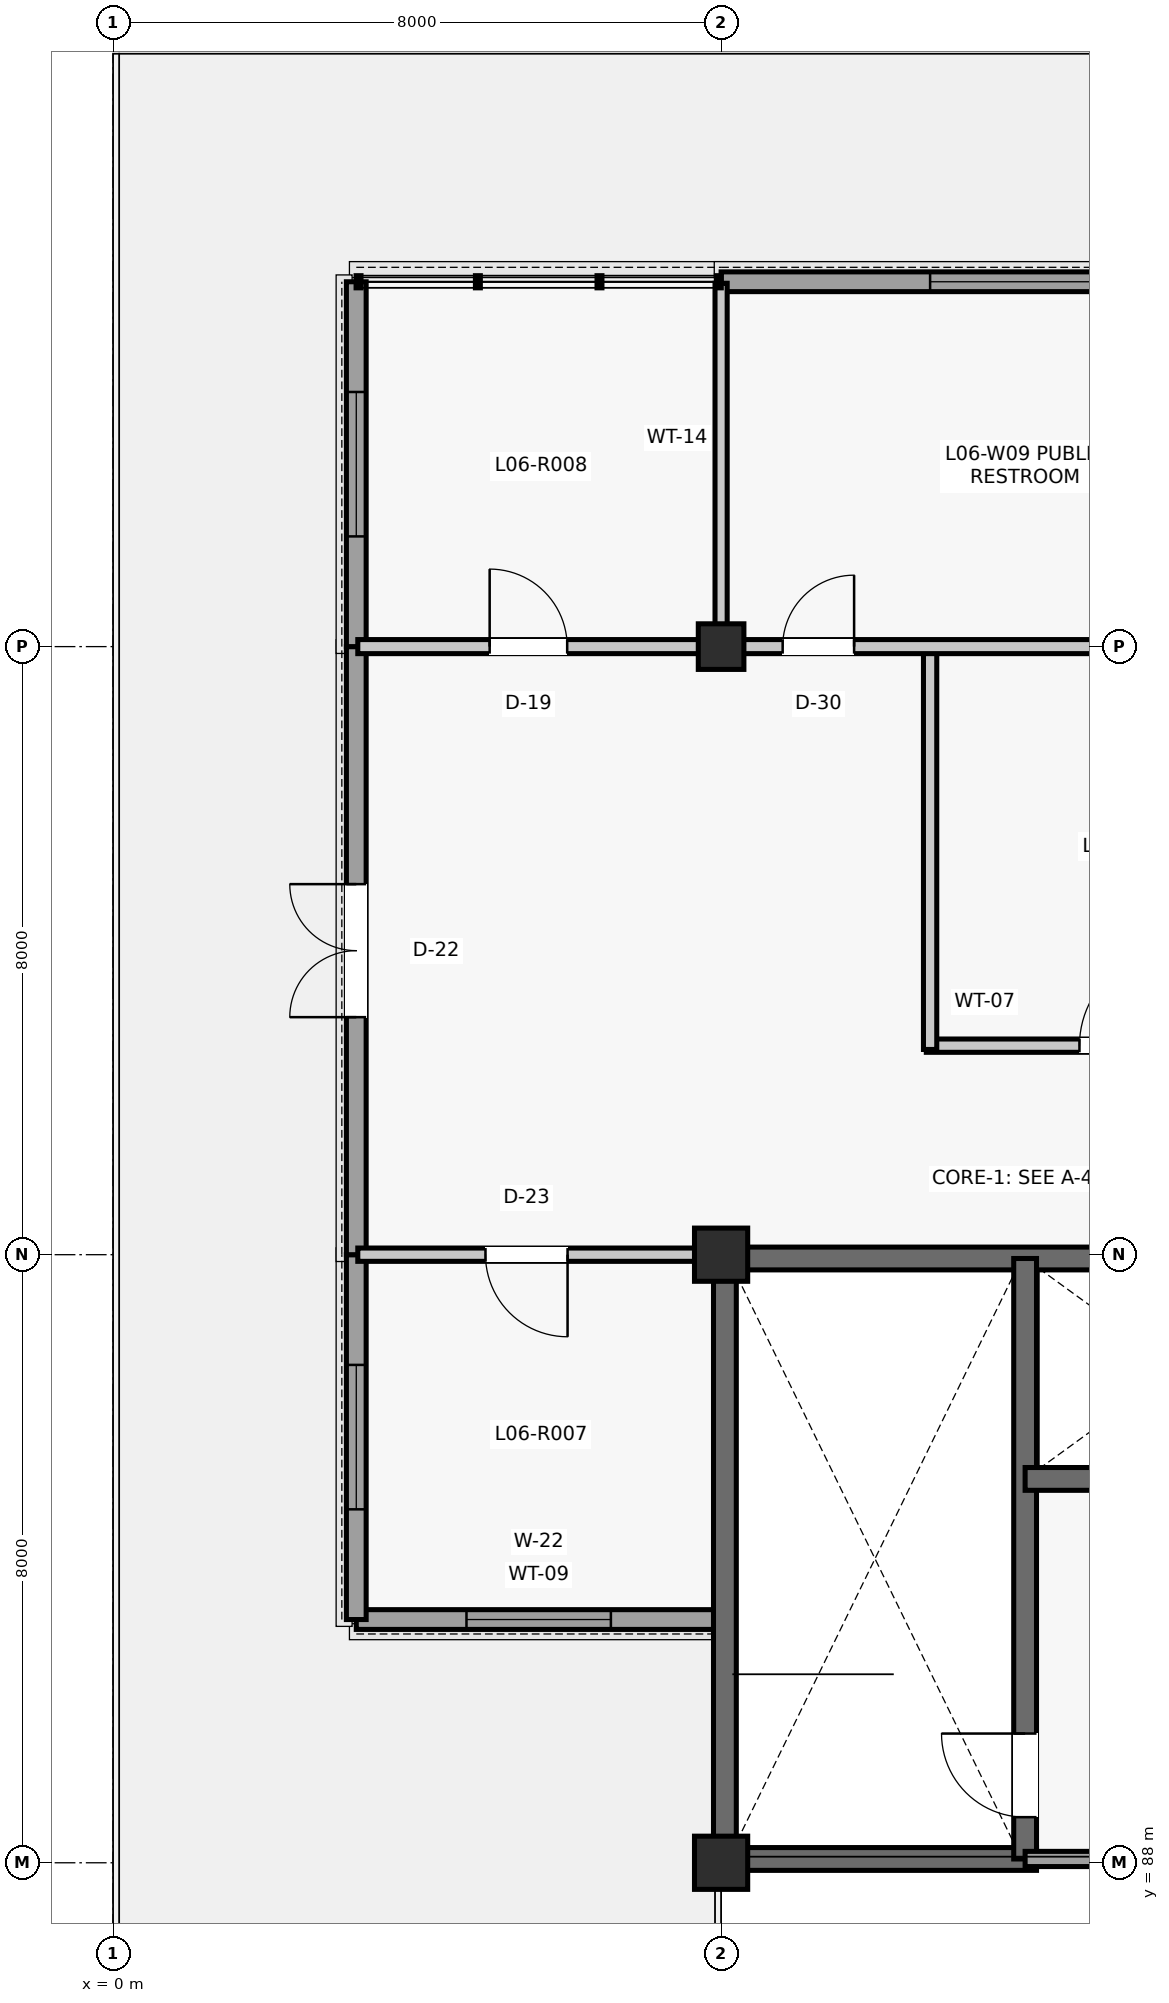
"""IFC4 building model, lengths in metres.
Left out: names, types, materials, properties, quantities, classifications, styles, units other than length and angle.
Written with IfcOpenShell. Run it as: python <this file> out.ifc"""

import sys

from ifc_helpers import new_model, si_unit, direction, frame, frame_2d, origin, origin_2d, place, context, subcontext, project, spatial, rectangle, extrude, element, fill, save


model = new_model("IFC4")
c1 = context("Model", 3, precision=1e-05, world=origin(), true_north=direction((0.0, 1.0)))
c2 = subcontext(c1, "Body", "Model", "MODEL_VIEW")
j1 = project(units=[si_unit("LENGTHUNIT", "METRE"), si_unit("PLANEANGLEUNIT", "RADIAN")], contexts=[c1])
p1 = place(None, origin())
s1 = spatial("IfcSite", under=j1, at=p1, CompositionType="ELEMENT")
p2 = place(p1, origin())
s2 = spatial("IfcBuilding", under=s1, at=p2, CompositionType="ELEMENT")
p3 = place(p2, frame((0.0, 0.0, 25.74)))
s3 = spatial("IfcBuildingStorey", under=s2, at=p3, CompositionType="ELEMENT", Elevation=25.74)
for number, where, z_axis, x_axis in (
    (1, (8.0, 88.0, 0.0), (0.0, 0.0, 1.0), (1.0, 0.0, 0.0)),
    (2, (8.0, 96.0, 0.0), (0.0, 0.0, 1.0), (1.0, 0.0, 0.0)),
):
    element("IfcColumn", number, at=place(p3, frame(where, z_axis=z_axis, x_axis=x_axis)), inside=s3, PredefinedType="COLUMN", context=c2, shape_type="SweptSolid", body=[
        extrude(rectangle(XDim=0.7, YDim=0.7, at=origin_2d()), origin(), (0.0, 0.0, 1.0), 4.29),
    ])
p4 = place(p3, frame((8.0, 104.0, 0.0), z_axis=(0.0, 0.0, 1.0), x_axis=(1.0, 0.0, 0.0)))
e3 = element("IfcColumn", 3, at=p4, inside=s3, PredefinedType="COLUMN", context=c2, shape_type="SweptSolid", body=[
    extrude(rectangle(XDim=0.6, YDim=0.6, at=origin_2d()), origin(), (0.0, 0.0, 1.0), 4.29),
])
p5 = place(p3, frame((3.2, 91.2, 0.0), z_axis=(0.0, 0.0, 1.0), x_axis=(1.0, 0.0, 0.0)))
e4 = element("IfcWall", 4, at=p5, inside=s3, PredefinedType="SOLIDWALL", context=c2, shape_type="SweptSolid", body=[
    extrude(rectangle(XDim=4.8, YDim=0.26, at=frame_2d((2.4, 0.0))), origin(), (0.0, 0.0, 1.0), 4.09),
])
p6 = place(p5, frame((1.45, 0.0, 0.85)))
e5 = element("IfcOpeningElement", 5, at=p6, cuts=e4, PredefinedType="OPENING", context=c2, shape_type="SweptSolid", body=[
    extrude(rectangle(XDim=1.9, YDim=2.2, at=frame_2d((0.95, 1.1))), frame((0.0, 0.14, 0.0), z_axis=(0.0, -1.0, 0.0), x_axis=(1.0, 0.0, 0.0)), (0.0, 0.0, 1.0), 0.28),
])
p7 = place(p3, frame((8.0, 108.8, 0.0), z_axis=(0.0, 0.0, 1.0), x_axis=(1.0, 0.0, 0.0)))
e6 = element("IfcWall", 6, at=p7, inside=s3, PredefinedType="SOLIDWALL", context=c2, shape_type="SweptSolid", body=[
    extrude(rectangle(XDim=8.0, YDim=0.26, at=frame_2d((4.0, 0.0))), origin(), (0.0, 0.0, 1.0), 4.09),
])
p8 = place(p7, frame((2.75, 0.0, 0.85)))
e7 = element("IfcOpeningElement", 7, at=p8, cuts=e6, PredefinedType="OPENING", context=c2, shape_type="SweptSolid", body=[
    extrude(rectangle(XDim=2.5, YDim=2.2, at=frame_2d((1.25, 1.1))), frame((0.0, 0.14, 0.0), z_axis=(0.0, -1.0, 0.0), x_axis=(1.0, 0.0, 0.0)), (0.0, 0.0, 1.0), 0.28),
])
p9 = place(p3, frame((3.2, 91.2, 0.0), z_axis=(0.0, 0.0, 1.0), x_axis=(0.0, 1.0, 0.0)))
e8 = element("IfcWall", 8, at=p9, inside=s3, PredefinedType="SOLIDWALL", context=c2, shape_type="SweptSolid", body=[
    extrude(rectangle(XDim=4.8, YDim=0.26, at=frame_2d((2.4, 0.0))), origin(), (0.0, 0.0, 1.0), 4.09),
])
p10 = place(p9, frame((1.45, 0.0, 0.85)))
e9 = element("IfcOpeningElement", 9, at=p10, cuts=e8, PredefinedType="OPENING", context=c2, shape_type="SweptSolid", body=[
    extrude(rectangle(XDim=1.9, YDim=2.2, at=frame_2d((0.95, 1.1))), frame((0.0, 0.14, 0.0), z_axis=(0.0, -1.0, 0.0), x_axis=(1.0, 0.0, 0.0)), (0.0, 0.0, 1.0), 0.28),
])
p11 = place(p3, frame((3.2, 96.0, 0.0), z_axis=(0.0, 0.0, 1.0), x_axis=(0.0, 1.0, 0.0)))
e10 = element("IfcWall", 10, at=p11, inside=s3, PredefinedType="SOLIDWALL", context=c2, shape_type="SweptSolid", body=[
    extrude(rectangle(XDim=8.0, YDim=0.26, at=frame_2d((4.0, 0.0))), origin(), (0.0, 0.0, 1.0), 4.09),
])
p12 = place(p11, frame((3.125, 0.0, 0.0)))
e11 = element("IfcOpeningElement", 11, at=p12, cuts=e10, PredefinedType="OPENING", context=c2, shape_type="SweptSolid", body=[
    extrude(rectangle(XDim=1.75, YDim=2.2, at=frame_2d((0.875, 1.1))), frame((0.0, 0.14, 0.0), z_axis=(0.0, -1.0, 0.0), x_axis=(1.0, 0.0, 0.0)), (0.0, 0.0, 1.0), 0.28),
])
p13 = place(p3, frame((3.2, 104.0, 0.0), z_axis=(0.0, 0.0, 1.0), x_axis=(0.0, 1.0, 0.0)))
e12 = element("IfcWall", 12, at=p13, inside=s3, PredefinedType="SOLIDWALL", context=c2, shape_type="SweptSolid", body=[
    extrude(rectangle(XDim=4.8, YDim=0.26, at=frame_2d((2.4, 0.0))), origin(), (0.0, 0.0, 1.0), 4.09),
])
p14 = place(p13, frame((1.45, 0.0, 0.85)))
e13 = element("IfcOpeningElement", 13, at=p14, cuts=e12, PredefinedType="OPENING", context=c2, shape_type="SweptSolid", body=[
    extrude(rectangle(XDim=1.9, YDim=2.2, at=frame_2d((0.95, 1.1))), frame((0.0, 0.14, 0.0), z_axis=(0.0, -1.0, 0.0), x_axis=(1.0, 0.0, 0.0)), (0.0, 0.0, 1.0), 0.28),
])
for number, where, z_axis, x_axis in (
    (14, (8.05, 88.24, 0.0), (0.0, 0.0, 1.0), (0.0, 1.0, 0.0)),
    (15, (8.24, 95.95, 0.0), (0.0, 0.0, 1.0), (1.0, 0.0, 0.0)),
):
    element("IfcWall", number, at=place(p3, frame(where, z_axis=z_axis, x_axis=x_axis)), inside=s3, PredefinedType="SHEAR", context=c2, shape_type="SweptSolid", body=[
        extrude(rectangle(XDim=7.52, YDim=0.3, at=frame_2d((3.76, 0.0))), origin(), (0.0, 0.0, 1.0), 4.09),
    ])
p15 = place(p3, frame((8.24, 88.05, 0.0), z_axis=(0.0, 0.0, 1.0), x_axis=(1.0, 0.0, 0.0)))
e16 = element("IfcWall", 16, at=p15, inside=s3, PredefinedType="SHEAR", context=c2, shape_type="SweptSolid", body=[
    extrude(rectangle(XDim=3.91, YDim=0.3, at=frame_2d((1.955, 0.0))), origin(), (0.0, 0.0, 1.0), 4.09),
])
p16 = place(p3, frame((12.0, 88.05, 0.0), z_axis=(0.0, 0.0, 1.0), x_axis=(0.0, 1.0, 0.0)))
e17 = element("IfcWall", 17, at=p16, inside=s3, PredefinedType="SHEAR", context=c2, shape_type="SweptSolid", body=[
    extrude(rectangle(XDim=7.9, YDim=0.3, at=frame_2d((3.95, 0.0))), origin(), (0.0, 0.0, 1.0), 4.09),
])
p17 = place(p16, frame((0.55, 0.0, 0.0)))
e18 = element("IfcOpeningElement", 18, at=p17, cuts=e17, PredefinedType="OPENING", context=c2, shape_type="SweptSolid", body=[
    extrude(rectangle(XDim=1.1, YDim=2.15, at=frame_2d((0.55, 1.075))), frame((0.0, 0.16, 0.0), z_axis=(0.0, -1.0, 0.0), x_axis=(1.0, 0.0, 0.0)), (0.0, 0.0, 1.0), 0.32),
])
p18 = place(p3, frame((12.0, 93.05, 0.0), z_axis=(0.0, 0.0, 1.0), x_axis=(1.0, 0.0, 0.0)))
e19 = element("IfcWall", 19, at=p18, inside=s3, PredefinedType="SHEAR", context=c2, shape_type="SweptSolid", body=[
    extrude(rectangle(XDim=3.95, YDim=0.3, at=frame_2d((1.975, 0.0))), origin(), (0.0, 0.0, 1.0), 4.09),
])
p19 = place(p18, frame((1.375, 0.0, 0.0)))
e20 = element("IfcOpeningElement", 20, at=p19, cuts=e19, PredefinedType="OPENING", context=c2, shape_type="SweptSolid", body=[
    extrude(rectangle(XDim=1.2, YDim=2.2, at=frame_2d((0.6, 1.1))), frame((0.0, 0.16, 0.0), z_axis=(0.0, -1.0, 0.0), x_axis=(1.0, 0.0, 0.0)), (0.0, 0.0, 1.0), 0.32),
])
p20 = place(p3, frame((12.0, 88.05, 0.0), z_axis=(0.0, 0.0, 1.0), x_axis=(1.0, 0.0, 0.0)))
e21 = element("IfcWall", 21, at=p20, inside=s3, PredefinedType="PARTITIONING", context=c2, shape_type="SweptSolid", body=[
    extrude(rectangle(XDim=3.66, YDim=0.2, at=frame_2d((1.83, 0.0))), origin(), (0.0, 0.0, 1.0), 3.408),
])
p21 = place(p3, frame((10.7, 98.75, 0.0), z_axis=(0.0, 0.0, 1.0), x_axis=(1.0, 0.0, 0.0)))
e22 = element("IfcWall", 22, at=p21, inside=s3, PredefinedType="PARTITIONING", context=c2, shape_type="SweptSolid", body=[
    extrude(rectangle(XDim=5.28, YDim=0.175, at=frame_2d((2.64, 0.0))), origin(), (0.0, 0.0, 1.0), 3.408),
])
p22 = place(p21, frame((2.015, 0.0, 0.0)))
e23 = element("IfcOpeningElement", 23, at=p22, cuts=e22, PredefinedType="OPENING", context=c2, shape_type="SweptSolid", body=[
    extrude(rectangle(XDim=1.25, YDim=2.18, at=frame_2d((0.625, 1.09))), frame((0.0, 0.097, 0.0), z_axis=(0.0, -1.0, 0.0), x_axis=(1.0, 0.0, 0.0)), (0.0, 0.0, 1.0), 0.195),
])
p23 = place(p3, frame((10.75, 98.7, 0.0), z_axis=(0.0, 0.0, 1.0), x_axis=(0.0, 1.0, 0.0)))
e24 = element("IfcWall", 24, at=p23, inside=s3, PredefinedType="PARTITIONING", context=c2, shape_type="SweptSolid", body=[
    extrude(rectangle(XDim=5.28, YDim=0.175, at=frame_2d((2.64, 0.0))), origin(), (0.0, 0.0, 1.0), 3.408),
])
p24 = place(p3, frame((3.22, 96.0, 0.0), z_axis=(0.0, 0.0, 1.0), x_axis=(1.0, 0.0, 0.0)))
e25 = element("IfcWall", 25, at=p24, inside=s3, PredefinedType="PARTITIONING", context=c2, shape_type="SweptSolid", body=[
    extrude(rectangle(XDim=4.44, YDim=0.175, at=frame_2d((2.22, 0.0))), origin(), (0.0, 0.0, 1.0), 3.408),
])
p25 = place(p24, frame((1.68, 0.0, 0.0)))
e26 = element("IfcOpeningElement", 26, at=p25, cuts=e25, PredefinedType="OPENING", context=c2, shape_type="SweptSolid", body=[
    extrude(rectangle(XDim=1.08, YDim=2.2, at=frame_2d((0.54, 1.1))), frame((0.0, 0.097, 0.0), z_axis=(0.0, -1.0, 0.0), x_axis=(1.0, 0.0, 0.0)), (0.0, 0.0, 1.0), 0.195),
])
p26 = place(p3, frame((3.22, 104.0, 0.0), z_axis=(0.0, 0.0, 1.0), x_axis=(1.0, 0.0, 0.0)))
e27 = element("IfcWall", 27, at=p26, inside=s3, PredefinedType="PARTITIONING", context=c2, shape_type="SweptSolid", body=[
    extrude(rectangle(XDim=4.49, YDim=0.185, at=frame_2d((2.245, 0.0))), origin(), (0.0, 0.0, 1.0), 3.408),
])
p27 = place(p26, frame((1.735, 0.0, 0.0)))
e28 = element("IfcOpeningElement", 28, at=p27, cuts=e27, PredefinedType="OPENING", context=c2, shape_type="SweptSolid", body=[
    extrude(rectangle(XDim=1.02, YDim=2.2, at=frame_2d((0.51, 1.1))), frame((0.0, 0.103, 0.0), z_axis=(0.0, -1.0, 0.0), x_axis=(1.0, 0.0, 0.0)), (0.0, 0.0, 1.0), 0.205),
])
p28 = place(p3, frame((8.0, 104.29, 0.0), z_axis=(0.0, 0.0, 1.0), x_axis=(0.0, 1.0, 0.0)))
e29 = element("IfcWall", 29, at=p28, inside=s3, PredefinedType="PARTITIONING", context=c2, shape_type="SweptSolid", body=[
    extrude(rectangle(XDim=4.49, YDim=0.16, at=frame_2d((2.245, 0.0))), origin(), (0.0, 0.0, 1.0), 3.408),
])
p29 = place(p3, frame((8.29, 104.0, 0.0), z_axis=(0.0, 0.0, 1.0), x_axis=(1.0, 0.0, 0.0)))
e30 = element("IfcWall", 30, at=p29, inside=s3, PredefinedType="PARTITIONING", context=c2, shape_type="SweptSolid", body=[
    extrude(rectangle(XDim=7.42, YDim=0.185, at=frame_2d((3.71, 0.0))), origin(), (0.0, 0.0, 1.0), 3.408),
])
p30 = place(p29, frame((0.52, 0.0, 0.0)))
e31 = element("IfcOpeningElement", 31, at=p30, cuts=e30, PredefinedType="OPENING", context=c2, shape_type="SweptSolid", body=[
    extrude(rectangle(XDim=0.94, YDim=2.12, at=frame_2d((0.47, 1.06))), frame((0.0, 0.103, 0.0), z_axis=(0.0, -1.0, 0.0), x_axis=(1.0, 0.0, 0.0)), (0.0, 0.0, 1.0), 0.205),
])
p31 = place(p6, origin())
e32 = element("IfcWindow", 32, at=p31, inside=s3, PartitioningType="SINGLE_PANEL", PredefinedType="WINDOW", context=c2, shape_type="SweptSolid", body=[
    extrude(rectangle(XDim=1.9, YDim=2.2, at=frame_2d((0.95, 1.1))), frame((0.0, 0.03, 0.0), z_axis=(0.0, -1.0, 0.0), x_axis=(1.0, 0.0, 0.0)), (0.0, 0.0, 1.0), 0.06),
])
fill(e5, e32)
p32 = place(p8, origin())
e33 = element("IfcWindow", 33, at=p32, inside=s3, PartitioningType="SINGLE_PANEL", PredefinedType="WINDOW", context=c2, shape_type="SweptSolid", body=[
    extrude(rectangle(XDim=2.5, YDim=2.2, at=frame_2d((1.25, 1.1))), frame((0.0, 0.03, 0.0), z_axis=(0.0, -1.0, 0.0), x_axis=(1.0, 0.0, 0.0)), (0.0, 0.0, 1.0), 0.06),
])
fill(e7, e33)
p33 = place(p10, origin())
e34 = element("IfcWindow", 34, at=p33, inside=s3, PartitioningType="SINGLE_PANEL", PredefinedType="WINDOW", context=c2, shape_type="SweptSolid", body=[
    extrude(rectangle(XDim=1.9, YDim=2.2, at=frame_2d((0.95, 1.1))), frame((0.0, 0.03, 0.0), z_axis=(0.0, -1.0, 0.0), x_axis=(1.0, 0.0, 0.0)), (0.0, 0.0, 1.0), 0.06),
])
fill(e9, e34)
p34 = place(p12, origin())
e35 = element("IfcDoor", 35, at=p34, inside=s3, OperationType="DOUBLE_DOOR_SINGLE_SWING", PredefinedType="DOOR", context=c2, shape_type="SweptSolid", body=[
    extrude(rectangle(XDim=1.75, YDim=2.2, at=frame_2d((0.875, 1.1))), frame((0.0, 0.025, 0.0), z_axis=(0.0, -1.0, 0.0), x_axis=(1.0, 0.0, 0.0)), (0.0, 0.0, 1.0), 0.05),
])
fill(e11, e35)
p35 = place(p14, origin())
e36 = element("IfcWindow", 36, at=p35, inside=s3, PartitioningType="SINGLE_PANEL", PredefinedType="WINDOW", context=c2, shape_type="SweptSolid", body=[
    extrude(rectangle(XDim=1.9, YDim=2.2, at=frame_2d((0.95, 1.1))), frame((0.0, 0.03, 0.0), z_axis=(0.0, -1.0, 0.0), x_axis=(1.0, 0.0, 0.0)), (0.0, 0.0, 1.0), 0.06),
])
fill(e13, e36)
p36 = place(p17, origin())
e37 = element("IfcDoor", 37, at=p36, inside=s3, OperationType="SINGLE_SWING_RIGHT", PredefinedType="DOOR", context=c2, shape_type="SweptSolid", body=[
    extrude(rectangle(XDim=1.1, YDim=2.15, at=frame_2d((0.55, 1.075))), frame((0.0, 0.025, 0.0), z_axis=(0.0, -1.0, 0.0), x_axis=(1.0, 0.0, 0.0)), (0.0, 0.0, 1.0), 0.05),
])
fill(e18, e37)
p37 = place(p22, origin())
e38 = element("IfcDoor", 38, at=p37, inside=s3, OperationType="SINGLE_SWING_RIGHT", PredefinedType="DOOR", context=c2, shape_type="SweptSolid", body=[
    extrude(rectangle(XDim=1.25, YDim=2.18, at=frame_2d((0.625, 1.09))), frame((0.0, 0.025, 0.0), z_axis=(0.0, -1.0, 0.0), x_axis=(1.0, 0.0, 0.0)), (0.0, 0.0, 1.0), 0.05),
])
fill(e23, e38)
p38 = place(p25, frame((1.08, 0.0, 0.0), z_axis=(0.0, 0.0, 1.0), x_axis=(-1.0, 0.0, 0.0)))
e39 = element("IfcDoor", 39, at=p38, inside=s3, OperationType="SINGLE_SWING_RIGHT", PredefinedType="DOOR", context=c2, shape_type="SweptSolid", body=[
    extrude(rectangle(XDim=1.08, YDim=2.2, at=frame_2d((0.54, 1.1))), frame((0.0, 0.025, 0.0), z_axis=(0.0, -1.0, 0.0), x_axis=(1.0, 0.0, 0.0)), (0.0, 0.0, 1.0), 0.05),
])
fill(e26, e39)
p39 = place(p27, origin())
e40 = element("IfcDoor", 40, at=p39, inside=s3, OperationType="SINGLE_SWING_LEFT", PredefinedType="DOOR", context=c2, shape_type="SweptSolid", body=[
    extrude(rectangle(XDim=1.02, YDim=2.2, at=frame_2d((0.51, 1.1))), frame((0.0, 0.025, 0.0), z_axis=(0.0, -1.0, 0.0), x_axis=(1.0, 0.0, 0.0)), (0.0, 0.0, 1.0), 0.05),
])
fill(e28, e40)
p40 = place(p30, origin())
e41 = element("IfcDoor", 41, at=p40, inside=s3, OperationType="SINGLE_SWING_RIGHT", PredefinedType="DOOR", context=c2, shape_type="SweptSolid", body=[
    extrude(rectangle(XDim=0.94, YDim=2.12, at=frame_2d((0.47, 1.06))), frame((0.0, 0.025, 0.0), z_axis=(0.0, -1.0, 0.0), x_axis=(1.0, 0.0, 0.0)), (0.0, 0.0, 1.0), 0.05),
])
fill(e31, e41)
save(model, sys.argv[1])
